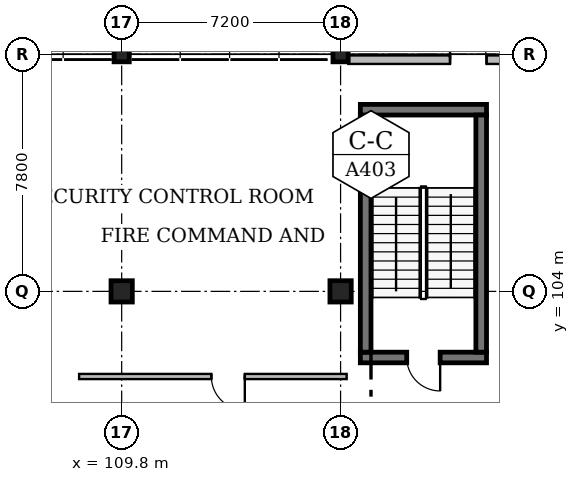
"""IFC4 building model, lengths in metres.
Left out: names, types, materials, properties, quantities, classifications, styles, units other than length and angle.
Written with IfcOpenShell. Run it as: python <this file> out.ifc"""

import sys

from ifc_helpers import new_model, si_unit, direction, frame, frame_2d, origin, origin_2d, place, context, subcontext, project, spatial, rectangle, extrude, element, fill, save


model = new_model("IFC4")
c1 = context("Model", 3, precision=1e-05, world=origin(), true_north=direction((0.0, 1.0)))
c2 = subcontext(c1, "Body", "Model", "MODEL_VIEW")
j1 = project(units=[si_unit("LENGTHUNIT", "METRE"), si_unit("PLANEANGLEUNIT", "RADIAN")], contexts=[c1])
p1 = place(None, origin())
s1 = spatial("IfcSite", under=j1, at=p1, CompositionType="ELEMENT")
p2 = place(p1, origin())
s2 = spatial("IfcBuilding", under=s1, at=p2, CompositionType="ELEMENT")
p3 = place(p2, origin())
s3 = spatial("IfcBuildingStorey", under=s2, at=p3, CompositionType="ELEMENT", Elevation=0.0)
p4 = place(p3, frame((109.8, 104.0, 0.0), z_axis=(0.0, 0.0, 1.0), x_axis=(1.0, 0.0, 0.0)))
e1 = element("IfcColumn", 1, at=p4, inside=s3, PredefinedType="COLUMN", context=c2, shape_type="SweptSolid", body=[
    extrude(rectangle(XDim=0.7, YDim=0.7, at=origin_2d()), origin(), (0.0, 0.0, 1.0), 4.8),
])
p5 = place(p3, frame((109.8, 111.8, 0.0), z_axis=(0.0, 0.0, 1.0), x_axis=(1.0, 0.0, 0.0)))
e2 = element("IfcColumn", 2, at=p5, inside=s3, PredefinedType="COLUMN", context=c2, shape_type="SweptSolid", body=[
    extrude(rectangle(XDim=0.5, YDim=0.5, at=origin_2d()), origin(), (0.0, 0.0, 1.0), 4.8),
])
p6 = place(p3, frame((117.0, 104.0, 0.0), z_axis=(0.0, 0.0, 1.0), x_axis=(1.0, 0.0, 0.0)))
e3 = element("IfcColumn", 3, at=p6, inside=s3, PredefinedType="COLUMN", context=c2, shape_type="SweptSolid", body=[
    extrude(rectangle(XDim=0.7, YDim=0.7, at=origin_2d()), origin(), (0.0, 0.0, 1.0), 4.8),
])
p7 = place(p3, frame((117.0, 111.8, 0.0), z_axis=(0.0, 0.0, 1.0), x_axis=(1.0, 0.0, 0.0)))
e4 = element("IfcColumn", 4, at=p7, inside=s3, PredefinedType="COLUMN", context=c2, shape_type="SweptSolid", body=[
    extrude(rectangle(XDim=0.5, YDim=0.5, at=origin_2d()), origin(), (0.0, 0.0, 1.0), 4.8),
])
p8 = place(p3, frame((121.8, 101.825, 0.0), z_axis=(0.0, 0.0, 1.0), x_axis=(-1.0, 0.0, 0.0)))
e5 = element("IfcWall", 5, at=p8, inside=s3, PredefinedType="SOLIDWALL", context=c2, shape_type="SweptSolid", body=[
    extrude(rectangle(XDim=4.15, YDim=0.35, at=frame_2d((2.075, 0.0))), origin(), (0.0, 0.0, 1.0), 4.8),
])
p9 = place(p8, frame((1.525, 0.0, 0.0)))
e6 = element("IfcOpeningElement", 6, at=p9, cuts=e5, PredefinedType="OPENING", context=c2, shape_type="SweptSolid", body=[
    extrude(rectangle(XDim=1.1, YDim=2.15, at=frame_2d((0.55, 1.075))), frame((0.0, 0.195, 0.0), z_axis=(0.0, -1.0, 0.0), x_axis=(1.0, 0.0, 0.0)), (0.0, 0.0, 1.0), 0.39),
])
p10 = place(p3, frame((117.825, 102.0, 0.0), z_axis=(0.0, 0.0, 1.0), x_axis=(0.0, 1.0, 0.0)))
e7 = element("IfcWall", 7, at=p10, inside=s3, PredefinedType="SOLIDWALL", context=c2, shape_type="SweptSolid", body=[
    extrude(rectangle(XDim=7.8, YDim=0.35, at=frame_2d((3.9, 0.0))), origin(), (0.0, 0.0, 1.0), 4.8),
])
p11 = place(p3, frame((117.65, 109.975, 0.0), z_axis=(0.0, 0.0, 1.0), x_axis=(1.0, 0.0, 0.0)))
e8 = element("IfcWall", 8, at=p11, inside=s3, PredefinedType="SOLIDWALL", context=c2, shape_type="SweptSolid", body=[
    extrude(rectangle(XDim=4.15, YDim=0.35, at=frame_2d((2.075, 0.0))), origin(), (0.0, 0.0, 1.0), 4.8),
])
p12 = place(p3, frame((121.625, 109.8, 0.0), z_axis=(0.0, 0.0, 1.0), x_axis=(0.0, -1.0, 0.0)))
e9 = element("IfcWall", 9, at=p12, inside=s3, PredefinedType="SOLIDWALL", context=c2, shape_type="SweptSolid", body=[
    extrude(rectangle(XDim=7.8, YDim=0.35, at=frame_2d((3.9, 0.0))), origin(), (0.0, 0.0, 1.0), 4.8),
])
p13 = place(p3, frame((117.255, 111.62, 0.0), z_axis=(0.0, 0.0, 1.0), x_axis=(1.0, 0.0, 0.0)))
e10 = element("IfcWall", 10, at=p13, inside=s3, PredefinedType="SOLIDWALL", context=c2, shape_type="SweptSolid", body=[
    extrude(rectangle(XDim=7.89, YDim=0.28, at=frame_2d((3.945, 0.0))), origin(), (0.0, 0.0, 1.0), 3.873),
])
p14 = place(p13, frame((3.345, 0.0, 0.0)))
e11 = element("IfcOpeningElement", 11, at=p14, cuts=e10, PredefinedType="OPENING", context=c2, shape_type="SweptSolid", body=[
    extrude(rectangle(XDim=1.2, YDim=2.2, at=frame_2d((0.6, 1.1))), frame((0.0, 0.16, 0.0), z_axis=(0.0, -1.0, 0.0), x_axis=(1.0, 0.0, 0.0)), (0.0, 0.0, 1.0), 0.32),
])
p15 = place(p3, frame((117.2, 101.2, 0.0), z_axis=(0.0, 0.0, 1.0), x_axis=(-1.0, 0.0, 0.0)))
e12 = element("IfcWall", 12, at=p15, inside=s3, PredefinedType="PARTITIONING", context=c2, shape_type="SweptSolid", body=[
    extrude(rectangle(XDim=8.8, YDim=0.17, at=frame_2d((4.4, 0.0))), origin(), (0.0, 0.0, 1.0), 4.54),
])
p16 = place(p15, frame((3.35, 0.0, 0.0)))
e13 = element("IfcOpeningElement", 13, at=p16, cuts=e12, PredefinedType="OPENING", context=c2, shape_type="SweptSolid", body=[
    extrude(rectangle(XDim=1.1, YDim=2.25, at=frame_2d((0.55, 1.125))), frame((0.0, 0.105, 0.0), z_axis=(0.0, -1.0, 0.0), x_axis=(1.0, 0.0, 0.0)), (0.0, 0.0, 1.0), 0.21),
])
p17 = place(p9, origin())
e14 = element("IfcDoor", 14, at=p17, inside=s3, OperationType="SINGLE_SWING_LEFT", PredefinedType="DOOR", context=c2, shape_type="SweptSolid", body=[
    extrude(rectangle(XDim=1.1, YDim=2.15, at=frame_2d((0.55, 1.075))), frame((0.0, 0.025, 0.0), z_axis=(0.0, -1.0, 0.0), x_axis=(1.0, 0.0, 0.0)), (0.0, 0.0, 1.0), 0.05),
])
fill(e6, e14)
p18 = place(p14, origin())
e15 = element("IfcDoor", 15, at=p18, inside=s3, OperationType="SINGLE_SWING_LEFT", PredefinedType="DOOR", context=c2, shape_type="SweptSolid", body=[
    extrude(rectangle(XDim=1.2, YDim=2.2, at=frame_2d((0.6, 1.1))), frame((0.0, 0.025, 0.0), z_axis=(0.0, -1.0, 0.0), x_axis=(1.0, 0.0, 0.0)), (0.0, 0.0, 1.0), 0.05),
])
fill(e11, e15)
p19 = place(p16, origin())
e16 = element("IfcDoor", 16, at=p19, inside=s3, OperationType="SINGLE_SWING_LEFT", PredefinedType="DOOR", context=c2, shape_type="SweptSolid", body=[
    extrude(rectangle(XDim=1.1, YDim=2.25, at=frame_2d((0.55, 1.125))), frame((0.0, 0.025, 0.0), z_axis=(0.0, -1.0, 0.0), x_axis=(1.0, 0.0, 0.0)), (0.0, 0.0, 1.0), 0.05),
])
fill(e13, e16)
save(model, sys.argv[1])
